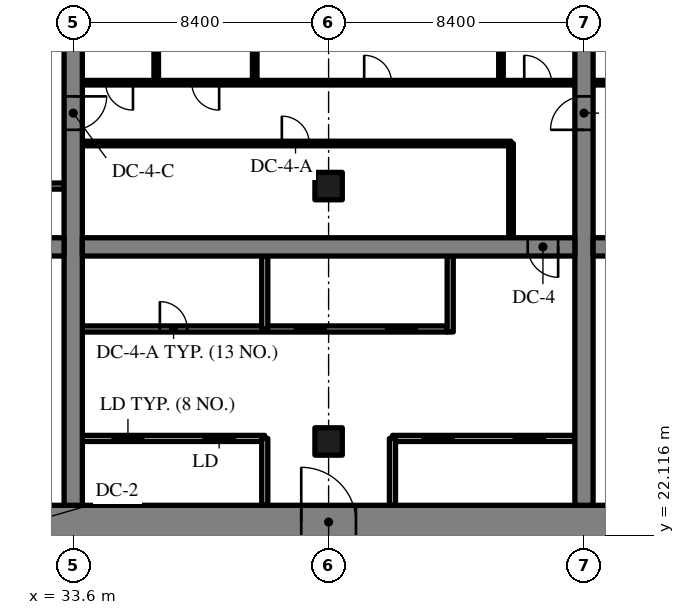
"""IFC4 building model, lengths in metres.
Left out: names, types, materials, properties, quantities, classifications, styles, units other than length and angle.
Written with IfcOpenShell. Run it as: python <this file> out.ifc"""

import sys

from ifc_helpers import new_model, si_unit, direction, frame, frame_2d, origin, origin_2d, place, context, subcontext, project, spatial, rectangle, extrude, source, transform, mapped, element, fill, save


model = new_model("IFC4")
c1 = context("Model", 3, precision=1e-05, world=origin(), true_north=direction((0.0, 1.0)))
c2 = subcontext(c1, "Body", "Model", "MODEL_VIEW")
j1 = project(units=[si_unit("LENGTHUNIT", "METRE"), si_unit("PLANEANGLEUNIT", "RADIAN")], contexts=[c1])
p1 = place(None, origin())
s1 = spatial("IfcSite", under=j1, at=p1, CompositionType="ELEMENT")
p2 = place(p1, origin())
s2 = spatial("IfcBuilding", under=s1, at=p2, CompositionType="ELEMENT")
p3 = place(p2, frame((0.0, 0.0, -13.5)))
s3 = spatial("IfcBuildingStorey", under=s2, at=p3, CompositionType="ELEMENT", Elevation=-13.5)
m1 = source(origin(), c2, "Body", "SweptSolid", [
    extrude(rectangle(XDim=50.4, YDim=1.1, at=frame_2d((25.2, 0.0))), origin(), (0.0, 0.0, 1.0), 4.52),
])
p4 = place(p3, frame((25.2, 22.55, -0.3), z_axis=(0.0, 0.0, 1.0), x_axis=(1.0, 0.0, 0.0)))
e1 = element("IfcWall", 1, at=p4, inside=s3, PredefinedType="SHEAR", context=c2, shape_type="MappedRepresentation", body=[
    mapped(m1, transform((0.0, 0.0, 0.0), scale=1.0)),
])
m2 = source(origin(), c2, "Body", "SweptSolid", [
    extrude(rectangle(XDim=1.8, YDim=2.1, at=frame_2d((0.9, 1.05))), frame((0.0, 0.56, 0.0), z_axis=(0.0, -1.0, 0.0), x_axis=(1.0, 0.0, 0.0)), (0.0, 0.0, 1.0), 1.12),
])
p5 = place(p4, frame((15.9, 0.0, 0.0)))
e2 = element("IfcOpeningElement", 2, at=p5, cuts=e1, PredefinedType="OPENING", context=c2, shape_type="MappedRepresentation", body=[
    mapped(m2, transform((0.0, 0.0, 0.0), scale=1.0)),
])
m3 = source(origin(), c2, "Body", "SweptSolid", [
    extrude(rectangle(XDim=1.2, YDim=2.1, at=frame_2d((0.6, 1.05))), frame((0.0, 0.56, 0.0), z_axis=(0.0, -1.0, 0.0), x_axis=(1.0, 0.0, 0.0)), (0.0, 0.0, 1.0), 1.12),
])
p6 = place(p4, frame((27.0, 0.0, 0.0)))
e3 = element("IfcOpeningElement", 3, at=p6, cuts=e1, PredefinedType="OPENING", context=c2, shape_type="MappedRepresentation", body=[
    mapped(m3, transform((0.0, 0.0, 0.0), scale=1.0)),
])
m4 = source(origin(), c2, "Body", "SweptSolid", [
    extrude(rectangle(XDim=0.9, YDim=2.1, at=frame_2d((0.45, 1.05))), frame((0.0, 0.56, 0.0), z_axis=(0.0, -1.0, 0.0), x_axis=(1.0, 0.0, 0.0)), (0.0, 0.0, 1.0), 1.12),
])
p7 = place(p4, frame((33.75, 0.0, 0.0)))
e4 = element("IfcOpeningElement", 4, at=p7, cuts=e1, PredefinedType="OPENING", context=c2, shape_type="MappedRepresentation", body=[
    mapped(m4, transform((0.0, 0.0, 0.0), scale=1.0)),
])
p8 = place(p4, frame((30.75, 0.0, 0.0)))
e5 = element("IfcOpeningElement", 5, at=p8, cuts=e1, PredefinedType="OPENING", context=c2, shape_type="MappedRepresentation", body=[
    mapped(m4, transform((0.0, 0.0, 0.0), scale=1.0)),
])
p9 = place(p4, frame((38.25, 0.0, 0.0)))
e6 = element("IfcOpeningElement", 6, at=p9, cuts=e1, PredefinedType="OPENING", context=c2, shape_type="MappedRepresentation", body=[
    mapped(m4, transform((0.0, 0.0, 0.0), scale=1.0)),
])
p10 = place(p4, frame((6.425, 0.0, 0.0)))
e7 = element("IfcOpeningElement", 7, at=p10, cuts=e1, PredefinedType="OPENING", context=c2, shape_type="MappedRepresentation", body=[
    mapped(m3, transform((0.0, 0.0, 0.0), scale=1.0)),
])
p11 = place(p4, frame((47.675, 0.0, 0.0)))
e8 = element("IfcOpeningElement", 8, at=p11, cuts=e1, PredefinedType="OPENING", context=c2, shape_type="MappedRepresentation", body=[
    mapped(m3, transform((0.0, 0.0, 0.0), scale=1.0)),
])
m5 = source(origin(), c2, "Body", "SweptSolid", [
    extrude(rectangle(XDim=17.8, YDim=0.6, at=frame_2d((8.9, 0.0))), origin(), (0.0, 0.0, 1.0), 4.52),
])
p12 = place(p3, frame((33.6, 23.1, -0.3), z_axis=(0.0, 0.0, 1.0), x_axis=(0.0, 1.0, 0.0)))
e9 = element("IfcWall", 9, at=p12, inside=s3, PredefinedType="SHEAR", context=c2, shape_type="MappedRepresentation", body=[
    mapped(m5, transform((0.0, 0.0, 0.0), scale=1.0)),
])
m6 = source(origin(), c2, "Body", "SweptSolid", [
    extrude(rectangle(XDim=1.1, YDim=2.1, at=frame_2d((0.55, 1.05))), frame((0.0, 0.31, 0.0), z_axis=(0.0, -1.0, 0.0), x_axis=(1.0, 0.0, 0.0)), (0.0, 0.0, 1.0), 0.62),
])
p13 = place(p12, frame((12.35, 0.0, 0.0)))
e10 = element("IfcOpeningElement", 10, at=p13, cuts=e9, PredefinedType="OPENING", context=c2, shape_type="MappedRepresentation", body=[
    mapped(m6, transform((0.0, 0.0, 0.0), scale=1.0)),
])
p14 = place(p3, frame((50.4, 23.1, -0.3), z_axis=(0.0, 0.0, 1.0), x_axis=(0.0, 1.0, 0.0)))
e11 = element("IfcWall", 11, at=p14, inside=s3, PredefinedType="SHEAR", context=c2, shape_type="MappedRepresentation", body=[
    mapped(m5, transform((0.0, 0.0, 0.0), scale=1.0)),
])
p15 = place(p14, frame((12.35, 0.0, 0.0)))
e12 = element("IfcOpeningElement", 12, at=p15, cuts=e11, PredefinedType="OPENING", context=c2, shape_type="MappedRepresentation", body=[
    mapped(m6, transform((0.0, 0.0, 0.0), scale=1.0)),
])
m7 = source(origin(), c2, "Body", "SweptSolid", [
    extrude(rectangle(XDim=7.0, YDim=0.6, at=frame_2d((3.5, 0.0))), origin(), (0.0, 0.0, 1.0), 4.52),
])
p16 = place(p3, frame((26.3, 31.6, -0.3), z_axis=(0.0, 0.0, 1.0), x_axis=(1.0, 0.0, 0.0)))
e13 = element("IfcWall", 13, at=p16, inside=s3, PredefinedType="SHEAR", context=c2, shape_type="MappedRepresentation", body=[
    mapped(m7, transform((0.0, 0.0, 0.0), scale=1.0)),
])
p17 = place(p16, frame((5.375, 0.0, 0.0)))
e14 = element("IfcOpeningElement", 14, at=p17, cuts=e13, PredefinedType="OPENING", context=c2, shape_type="MappedRepresentation", body=[
    mapped(m6, transform((0.0, 0.0, 0.0), scale=1.0)),
])
m8 = source(origin(), c2, "Body", "SweptSolid", [
    extrude(rectangle(XDim=16.2, YDim=0.6, at=frame_2d((8.1, 0.0))), origin(), (0.0, 0.0, 1.0), 4.52),
])
p18 = place(p3, frame((33.9, 31.6, -0.3), z_axis=(0.0, 0.0, 1.0), x_axis=(1.0, 0.0, 0.0)))
e15 = element("IfcWall", 15, at=p18, inside=s3, PredefinedType="SHEAR", context=c2, shape_type="MappedRepresentation", body=[
    mapped(m8, transform((0.0, 0.0, 0.0), scale=1.0)),
])
m9 = source(origin(), c2, "Body", "SweptSolid", [
    extrude(rectangle(XDim=1.0, YDim=2.1, at=frame_2d((0.5, 1.05))), frame((0.0, 0.31, 0.0), z_axis=(0.0, -1.0, 0.0), x_axis=(1.0, 0.0, 0.0)), (0.0, 0.0, 1.0), 0.62),
])
p19 = place(p18, frame((14.65, 0.0, 0.0)))
e16 = element("IfcOpeningElement", 16, at=p19, cuts=e15, PredefinedType="OPENING", context=c2, shape_type="MappedRepresentation", body=[
    mapped(m9, transform((0.0, 0.0, 0.0), scale=1.0)),
])
m10 = source(origin(), c2, "Body", "SweptSolid", [
    extrude(rectangle(XDim=16.2, YDim=0.6, at=frame_2d((8.1, 0.0))), origin(), (0.0, 0.0, 1.0), 4.52),
])
p20 = place(p3, frame((50.7, 31.6, -0.3), z_axis=(0.0, 0.0, 1.0), x_axis=(1.0, 0.0, 0.0)))
e17 = element("IfcWall", 17, at=p20, inside=s3, PredefinedType="SHEAR", context=c2, shape_type="MappedRepresentation", body=[
    mapped(m10, transform((0.0, 0.0, 0.0), scale=1.0)),
])
p21 = place(p20, frame((0.55, 0.0, 0.0)))
e18 = element("IfcOpeningElement", 18, at=p21, cuts=e17, PredefinedType="OPENING", context=c2, shape_type="MappedRepresentation", body=[
    mapped(m9, transform((0.0, 0.0, 0.0), scale=1.0)),
])
m11 = source(origin(), c2, "Body", "SweptSolid", [
    extrude(rectangle(XDim=0.9, YDim=0.9, at=origin_2d()), origin(), (0.0, 0.0, 1.0), 4.52),
])
for number, where, z_axis, x_axis in (
    (19, (42.0, 25.2, -0.3), (0.0, 0.0, 1.0), (1.0, 0.0, 0.0)),
    (20, (42.0, 33.6, -0.3), (0.0, 0.0, 1.0), (1.0, 0.0, 0.0)),
):
    element("IfcColumn", number, at=place(p3, frame(where, z_axis=z_axis, x_axis=x_axis)), inside=s3, PredefinedType="COLUMN", context=c2, shape_type="MappedRepresentation", body=[
        mapped(m11, transform((0.0, 0.0, 0.0), scale=1.0)),
    ])
m12 = source(origin(), c2, "Body", "SweptSolid", [
    extrude(rectangle(XDim=6.0, YDim=0.2, at=frame_2d((3.0, 0.0))), origin(), (0.0, 0.0, 1.0), 4.22),
])
p22 = place(p3, frame((33.9, 25.3, 0.0), z_axis=(0.0, 0.0, 1.0), x_axis=(1.0, 0.0, 0.0)))
e21 = element("IfcWall", 21, at=p22, inside=s3, PredefinedType="SOLIDWALL", context=c2, shape_type="MappedRepresentation", body=[
    mapped(m12, transform((0.0, 0.0, 0.0), scale=1.0)),
])
m13 = source(origin(), c2, "Body", "SweptSolid", [
    extrude(rectangle(XDim=1.1, YDim=2.1, at=frame_2d((0.55, 1.05))), frame((0.0, 0.11, 0.0), z_axis=(0.0, -1.0, 0.0), x_axis=(1.0, 0.0, 0.0)), (0.0, 0.0, 1.0), 0.22),
])
p23 = place(p22, frame((0.95, 0.0, 0.0)))
e22 = element("IfcOpeningElement", 22, at=p23, cuts=e21, PredefinedType="OPENING", context=c2, shape_type="MappedRepresentation", body=[
    mapped(m13, transform((0.0, 0.0, 0.0), scale=1.0)),
])
p24 = place(p22, frame((3.95, 0.0, 0.0)))
e23 = element("IfcOpeningElement", 23, at=p24, cuts=e21, PredefinedType="OPENING", context=c2, shape_type="MappedRepresentation", body=[
    mapped(m13, transform((0.0, 0.0, 0.0), scale=1.0)),
])
p25 = place(p3, frame((44.1, 25.3, 0.0), z_axis=(0.0, 0.0, 1.0), x_axis=(1.0, 0.0, 0.0)))
e24 = element("IfcWall", 24, at=p25, inside=s3, PredefinedType="SOLIDWALL", context=c2, shape_type="MappedRepresentation", body=[
    mapped(m12, transform((0.0, 0.0, 0.0), scale=1.0)),
])
p26 = place(p25, frame((0.95, 0.0, 0.0)))
e25 = element("IfcOpeningElement", 25, at=p26, cuts=e24, PredefinedType="OPENING", context=c2, shape_type="MappedRepresentation", body=[
    mapped(m13, transform((0.0, 0.0, 0.0), scale=1.0)),
])
p27 = place(p25, frame((3.95, 0.0, 0.0)))
e26 = element("IfcOpeningElement", 26, at=p27, cuts=e24, PredefinedType="OPENING", context=c2, shape_type="MappedRepresentation", body=[
    mapped(m13, transform((0.0, 0.0, 0.0), scale=1.0)),
])
m14 = source(origin(), c2, "Body", "SweptSolid", [
    extrude(rectangle(XDim=12.0, YDim=0.2, at=frame_2d((6.0, 0.0))), origin(), (0.0, 0.0, 1.0), 4.22),
])
p28 = place(p3, frame((33.9, 28.9, 0.0), z_axis=(0.0, 0.0, 1.0), x_axis=(1.0, 0.0, 0.0)))
e27 = element("IfcWall", 27, at=p28, inside=s3, PredefinedType="SOLIDWALL", context=c2, shape_type="MappedRepresentation", body=[
    mapped(m14, transform((0.0, 0.0, 0.0), scale=1.0)),
])
p29 = place(p28, frame((6.95, 0.0, 0.0)))
e28 = element("IfcOpeningElement", 28, at=p29, cuts=e27, PredefinedType="OPENING", context=c2, shape_type="MappedRepresentation", body=[
    mapped(m13, transform((0.0, 0.0, 0.0), scale=1.0)),
])
p30 = place(p28, frame((9.95, 0.0, 0.0)))
e29 = element("IfcOpeningElement", 29, at=p30, cuts=e27, PredefinedType="OPENING", context=c2, shape_type="MappedRepresentation", body=[
    mapped(m13, transform((0.0, 0.0, 0.0), scale=1.0)),
])
m15 = source(origin(), c2, "Body", "SweptSolid", [
    extrude(rectangle(XDim=0.9, YDim=2.1, at=frame_2d((0.45, 1.05))), frame((0.0, 0.11, 0.0), z_axis=(0.0, -1.0, 0.0), x_axis=(1.0, 0.0, 0.0)), (0.0, 0.0, 1.0), 0.22),
])
p31 = place(p28, frame((2.55, 0.0, 0.0)))
e30 = element("IfcOpeningElement", 30, at=p31, cuts=e27, PredefinedType="OPENING", context=c2, shape_type="MappedRepresentation", body=[
    mapped(m15, transform((0.0, 0.0, 0.0), scale=1.0)),
])
m16 = source(origin(), c2, "Body", "SweptSolid", [
    extrude(rectangle(XDim=2.2, YDim=0.2, at=frame_2d((1.1, 0.0))), origin(), (0.0, 0.0, 1.0), 4.22),
])
for number, where, z_axis, x_axis in (
    (31, (39.9, 23.1, 0.0), (0.0, 0.0, 1.0), (0.0, 1.0, 0.0)),
    (32, (44.1, 23.1, 0.0), (0.0, 0.0, 1.0), (0.0, 1.0, 0.0)),
):
    element("IfcWall", number, at=place(p3, frame(where, z_axis=z_axis, x_axis=x_axis)), inside=s3, PredefinedType="SOLIDWALL", context=c2, shape_type="MappedRepresentation", body=[
        mapped(m16, transform((0.0, 0.0, 0.0), scale=1.0)),
    ])
m17 = source(origin(), c2, "Body", "SweptSolid", [
    extrude(rectangle(XDim=2.5, YDim=0.2, at=frame_2d((1.25, 0.0))), origin(), (0.0, 0.0, 1.0), 4.22),
])
p32 = place(p3, frame((46.0, 28.8, 0.0), z_axis=(0.0, 0.0, 1.0), x_axis=(0.0, 1.0, 0.0)))
e33 = element("IfcWall", 33, at=p32, inside=s3, PredefinedType="SOLIDWALL", context=c2, shape_type="MappedRepresentation", body=[
    mapped(m17, transform((0.0, 0.0, 0.0), scale=1.0)),
])
m18 = source(origin(), c2, "Body", "SweptSolid", [
    extrude(rectangle(XDim=2.4, YDim=0.2, at=frame_2d((1.2, 0.0))), origin(), (0.0, 0.0, 1.0), 4.22),
])
p33 = place(p3, frame((39.9, 28.9, 0.0), z_axis=(0.0, 0.0, 1.0), x_axis=(0.0, 1.0, 0.0)))
e34 = element("IfcWall", 34, at=p33, inside=s3, PredefinedType="PARTITIONING", context=c2, shape_type="MappedRepresentation", body=[
    mapped(m18, transform((0.0, 0.0, 0.0), scale=1.0)),
])
m19 = source(origin(), c2, "Body", "SweptSolid", [
    extrude(rectangle(XDim=3.1, YDim=0.15, at=frame_2d((1.55, 0.0))), origin(), (0.0, 0.0, 1.0), 4.22),
])
p34 = place(p3, frame((48.0, 31.9, 0.0), z_axis=(0.0, 0.0, 1.0), x_axis=(0.0, 1.0, 0.0)))
e35 = element("IfcWall", 35, at=p34, inside=s3, PredefinedType="PARTITIONING", context=c2, shape_type="MappedRepresentation", body=[
    mapped(m19, transform((0.0, 0.0, 0.0), scale=1.0)),
])
m20 = source(origin(), c2, "Body", "SweptSolid", [
    extrude(rectangle(XDim=14.1, YDim=0.15, at=frame_2d((7.05, 0.0))), origin(), (0.0, 0.0, 1.0), 4.22),
])
p35 = place(p3, frame((33.9, 35.0, 0.0), z_axis=(0.0, 0.0, 1.0), x_axis=(1.0, 0.0, 0.0)))
e36 = element("IfcWall", 36, at=p35, inside=s3, PredefinedType="PARTITIONING", context=c2, shape_type="MappedRepresentation", body=[
    mapped(m20, transform((0.0, 0.0, 0.0), scale=1.0)),
])
m21 = source(origin(), c2, "Body", "SweptSolid", [
    extrude(rectangle(XDim=0.9, YDim=2.1, at=frame_2d((0.45, 1.05))), frame((0.0, 0.085, 0.0), z_axis=(0.0, -1.0, 0.0), x_axis=(1.0, 0.0, 0.0)), (0.0, 0.0, 1.0), 0.17),
])
p36 = place(p35, frame((6.562, 0.0, 0.0)))
e37 = element("IfcOpeningElement", 37, at=p36, cuts=e36, PredefinedType="OPENING", context=c2, shape_type="MappedRepresentation", body=[
    mapped(m21, transform((0.0, 0.0, 0.0), scale=1.0)),
])
m22 = source(origin(), c2, "Body", "SweptSolid", [
    extrude(rectangle(XDim=16.2, YDim=0.15, at=frame_2d((8.1, 0.0))), origin(), (0.0, 0.0, 1.0), 4.22),
])
p37 = place(p3, frame((33.9, 37.0, 0.0), z_axis=(0.0, 0.0, 1.0), x_axis=(1.0, 0.0, 0.0)))
e38 = element("IfcWall", 38, at=p37, inside=s3, PredefinedType="PARTITIONING", context=c2, shape_type="MappedRepresentation", body=[
    mapped(m22, transform((0.0, 0.0, 0.0), scale=1.0)),
])
p38 = place(p37, frame((0.765, 0.0, 0.0)))
e39 = element("IfcOpeningElement", 39, at=p38, cuts=e38, PredefinedType="OPENING", context=c2, shape_type="MappedRepresentation", body=[
    mapped(m21, transform((0.0, 0.0, 0.0), scale=1.0)),
])
p39 = place(p37, frame((3.6, 0.0, 0.0)))
e40 = element("IfcOpeningElement", 40, at=p39, cuts=e38, PredefinedType="OPENING", context=c2, shape_type="MappedRepresentation", body=[
    mapped(m21, transform((0.0, 0.0, 0.0), scale=1.0)),
])
p40 = place(p37, frame((9.27, 0.0, 0.0)))
e41 = element("IfcOpeningElement", 41, at=p40, cuts=e38, PredefinedType="OPENING", context=c2, shape_type="MappedRepresentation", body=[
    mapped(m21, transform((0.0, 0.0, 0.0), scale=1.0)),
])
p41 = place(p37, frame((14.535, 0.0, 0.0)))
e42 = element("IfcOpeningElement", 42, at=p41, cuts=e38, PredefinedType="OPENING", context=c2, shape_type="MappedRepresentation", body=[
    mapped(m21, transform((0.0, 0.0, 0.0), scale=1.0)),
])
m23 = source(origin(), c2, "Body", "SweptSolid", [
    extrude(rectangle(XDim=3.9, YDim=0.15, at=frame_2d((1.95, 0.0))), origin(), (0.0, 0.0, 1.0), 4.22),
])
for number, where, z_axis, x_axis in (
    (43, (36.33, 37.0, 0.0), (0.0, 0.0, 1.0), (0.0, 1.0, 0.0)),
    (44, (39.57, 37.0, 0.0), (0.0, 0.0, 1.0), (0.0, 1.0, 0.0)),
    (45, (47.67, 37.0, 0.0), (0.0, 0.0, 1.0), (0.0, 1.0, 0.0)),
):
    element("IfcWall", number, at=place(p3, frame(where, z_axis=z_axis, x_axis=x_axis)), inside=s3, PredefinedType="PARTITIONING", context=c2, shape_type="MappedRepresentation", body=[
        mapped(m23, transform((0.0, 0.0, 0.0), scale=1.0)),
    ])
m24 = source(origin(), c2, "Body", "SweptSolid", [
    extrude(rectangle(XDim=16.2, YDim=0.15, at=frame_2d((8.1, 0.0))), origin(), (0.0, 0.0, 1.0), 4.22),
])
p42 = place(p3, frame((66.9, 37.0, 0.0), z_axis=(0.0, 0.0, 1.0), x_axis=(-1.0, 0.0, 0.0)))
e46 = element("IfcWall", 46, at=p42, inside=s3, PredefinedType="PARTITIONING", context=c2, shape_type="MappedRepresentation", body=[
    mapped(m24, transform((0.0, 0.0, 0.0), scale=1.0)),
])
p43 = place(p42, frame((6.435, 0.0, 0.0)))
e47 = element("IfcOpeningElement", 47, at=p43, cuts=e46, PredefinedType="OPENING", context=c2, shape_type="MappedRepresentation", body=[
    mapped(m21, transform((0.0, 0.0, 0.0), scale=1.0)),
])
p44 = place(p42, frame((14.535, 0.0, 0.0)))
e48 = element("IfcOpeningElement", 48, at=p44, cuts=e46, PredefinedType="OPENING", context=c2, shape_type="MappedRepresentation", body=[
    mapped(m21, transform((0.0, 0.0, 0.0), scale=1.0)),
])
m25 = source(origin(), c2, "Body", "SweptSolid", [
    extrude(rectangle(XDim=2.15, YDim=0.2, at=frame_2d((1.075, 0.0))), origin(), (0.0, 0.0, 1.0), 4.22),
])
p45 = place(p3, frame((31.15, 33.6, 0.0), z_axis=(0.0, 0.0, 1.0), x_axis=(1.0, 0.0, 0.0)))
e49 = element("IfcWall", 49, at=p45, inside=s3, PredefinedType="SOLIDWALL", context=c2, shape_type="MappedRepresentation", body=[
    mapped(m25, transform((0.0, 0.0, 0.0), scale=1.0)),
])
m26 = source(origin(), c2, "Body", "SweptSolid", [
    extrude(rectangle(XDim=1.8, YDim=2.1, at=frame_2d((0.9, 1.05))), frame((0.0, 0.325, 0.0), z_axis=(0.0, -1.0, 0.0), x_axis=(1.0, 0.0, 0.0)), (0.0, 0.0, 1.0), 0.05),
])
p46 = place(p5, origin())
e50 = element("IfcDoor", 50, at=p46, inside=s3, OperationType="DOUBLE_DOOR_SINGLE_SWING", PredefinedType="DOOR", context=c2, shape_type="MappedRepresentation", body=[
    mapped(m26, transform((0.0, 0.0, 0.0), scale=1.0)),
])
fill(e2, e50)
m27 = source(origin(), c2, "Body", "SweptSolid", [
    extrude(rectangle(XDim=1.0, YDim=2.1, at=frame_2d((0.5, 1.05))), frame((0.0, 0.025, 0.0), z_axis=(0.0, -1.0, 0.0), x_axis=(1.0, 0.0, 0.0)), (0.0, 0.0, 1.0), 0.05),
])
p47 = place(p19, origin())
e51 = element("IfcDoor", 51, at=p47, inside=s3, OperationType="SINGLE_SWING_RIGHT", PredefinedType="DOOR", context=c2, shape_type="MappedRepresentation", body=[
    mapped(m27, transform((0.0, 0.0, 0.0), scale=1.0)),
])
fill(e16, e51)
m28 = source(origin(), c2, "Body", "SweptSolid", [
    extrude(rectangle(XDim=1.1, YDim=2.1, at=frame_2d((0.55, 1.05))), frame((0.0, 0.025, 0.0), z_axis=(0.0, -1.0, 0.0), x_axis=(1.0, 0.0, 0.0)), (0.0, 0.0, 1.0), 0.05),
])
p48 = place(p23, origin())
e52 = element("IfcDoor", 52, at=p48, inside=s3, OperationType="SLIDING_TO_LEFT", PredefinedType="DOOR", context=c2, shape_type="MappedRepresentation", body=[
    mapped(m28, transform((0.0, 0.0, 0.0), scale=1.0)),
])
fill(e22, e52)
p49 = place(p24, origin())
e53 = element("IfcDoor", 53, at=p49, inside=s3, OperationType="SLIDING_TO_RIGHT", PredefinedType="DOOR", context=c2, shape_type="MappedRepresentation", body=[
    mapped(m28, transform((0.0, 0.0, 0.0), scale=1.0)),
])
fill(e23, e53)
p50 = place(p26, origin())
e54 = element("IfcDoor", 54, at=p50, inside=s3, OperationType="SLIDING_TO_LEFT", PredefinedType="DOOR", context=c2, shape_type="MappedRepresentation", body=[
    mapped(m28, transform((0.0, 0.0, 0.0), scale=1.0)),
])
fill(e25, e54)
p51 = place(p27, origin())
e55 = element("IfcDoor", 55, at=p51, inside=s3, OperationType="SLIDING_TO_RIGHT", PredefinedType="DOOR", context=c2, shape_type="MappedRepresentation", body=[
    mapped(m28, transform((0.0, 0.0, 0.0), scale=1.0)),
])
fill(e26, e55)
p52 = place(p29, origin())
e56 = element("IfcDoor", 56, at=p52, inside=s3, OperationType="SLIDING_TO_LEFT", PredefinedType="DOOR", context=c2, shape_type="MappedRepresentation", body=[
    mapped(m28, transform((0.0, 0.0, 0.0), scale=1.0)),
])
fill(e28, e56)
p53 = place(p30, origin())
e57 = element("IfcDoor", 57, at=p53, inside=s3, OperationType="SLIDING_TO_RIGHT", PredefinedType="DOOR", context=c2, shape_type="MappedRepresentation", body=[
    mapped(m28, transform((0.0, 0.0, 0.0), scale=1.0)),
])
fill(e29, e57)
m29 = source(origin(), c2, "Body", "SweptSolid", [
    extrude(rectangle(XDim=0.9, YDim=2.1, at=frame_2d((0.45, 1.05))), frame((0.0, 0.025, 0.0), z_axis=(0.0, -1.0, 0.0), x_axis=(1.0, 0.0, 0.0)), (0.0, 0.0, 1.0), 0.05),
])
p54 = place(p31, origin())
e58 = element("IfcDoor", 58, at=p54, inside=s3, OperationType="SINGLE_SWING_LEFT", PredefinedType="DOOR", context=c2, shape_type="MappedRepresentation", body=[
    mapped(m29, transform((0.0, 0.0, 0.0), scale=1.0)),
])
fill(e30, e58)
p55 = place(p36, origin())
e59 = element("IfcDoor", 59, at=p55, inside=s3, OperationType="SINGLE_SWING_LEFT", PredefinedType="DOOR", context=c2, shape_type="MappedRepresentation", body=[
    mapped(m29, transform((0.0, 0.0, 0.0), scale=1.0)),
])
fill(e37, e59)
p56 = place(p38, origin())
e60 = element("IfcDoor", 60, at=p56, inside=s3, OperationType="SINGLE_SWING_RIGHT", PredefinedType="DOOR", context=c2, shape_type="MappedRepresentation", body=[
    mapped(m29, transform((0.0, 0.0, 0.0), scale=1.0)),
])
fill(e39, e60)
p57 = place(p39, origin())
e61 = element("IfcDoor", 61, at=p57, inside=s3, OperationType="SINGLE_SWING_RIGHT", PredefinedType="DOOR", context=c2, shape_type="MappedRepresentation", body=[
    mapped(m29, transform((0.0, 0.0, 0.0), scale=1.0)),
])
fill(e40, e61)
p58 = place(p40, origin())
e62 = element("IfcDoor", 62, at=p58, inside=s3, OperationType="SINGLE_SWING_LEFT", PredefinedType="DOOR", context=c2, shape_type="MappedRepresentation", body=[
    mapped(m29, transform((0.0, 0.0, 0.0), scale=1.0)),
])
fill(e41, e62)
p59 = place(p41, origin())
e63 = element("IfcDoor", 63, at=p59, inside=s3, OperationType="SINGLE_SWING_LEFT", PredefinedType="DOOR", context=c2, shape_type="MappedRepresentation", body=[
    mapped(m29, transform((0.0, 0.0, 0.0), scale=1.0)),
])
fill(e42, e63)
p60 = place(p13, origin())
e64 = element("IfcDoor", 64, at=p60, inside=s3, OperationType="SINGLE_SWING_RIGHT", PredefinedType="DOOR", context=c2, shape_type="MappedRepresentation", body=[
    mapped(m28, transform((0.0, 0.0, 0.0), scale=1.0)),
])
fill(e10, e64)
p61 = place(p15, origin())
e65 = element("IfcDoor", 65, at=p61, inside=s3, OperationType="SINGLE_SWING_LEFT", PredefinedType="DOOR", context=c2, shape_type="MappedRepresentation", body=[
    mapped(m28, transform((0.0, 0.0, 0.0), scale=1.0)),
])
fill(e12, e65)
save(model, sys.argv[1])
